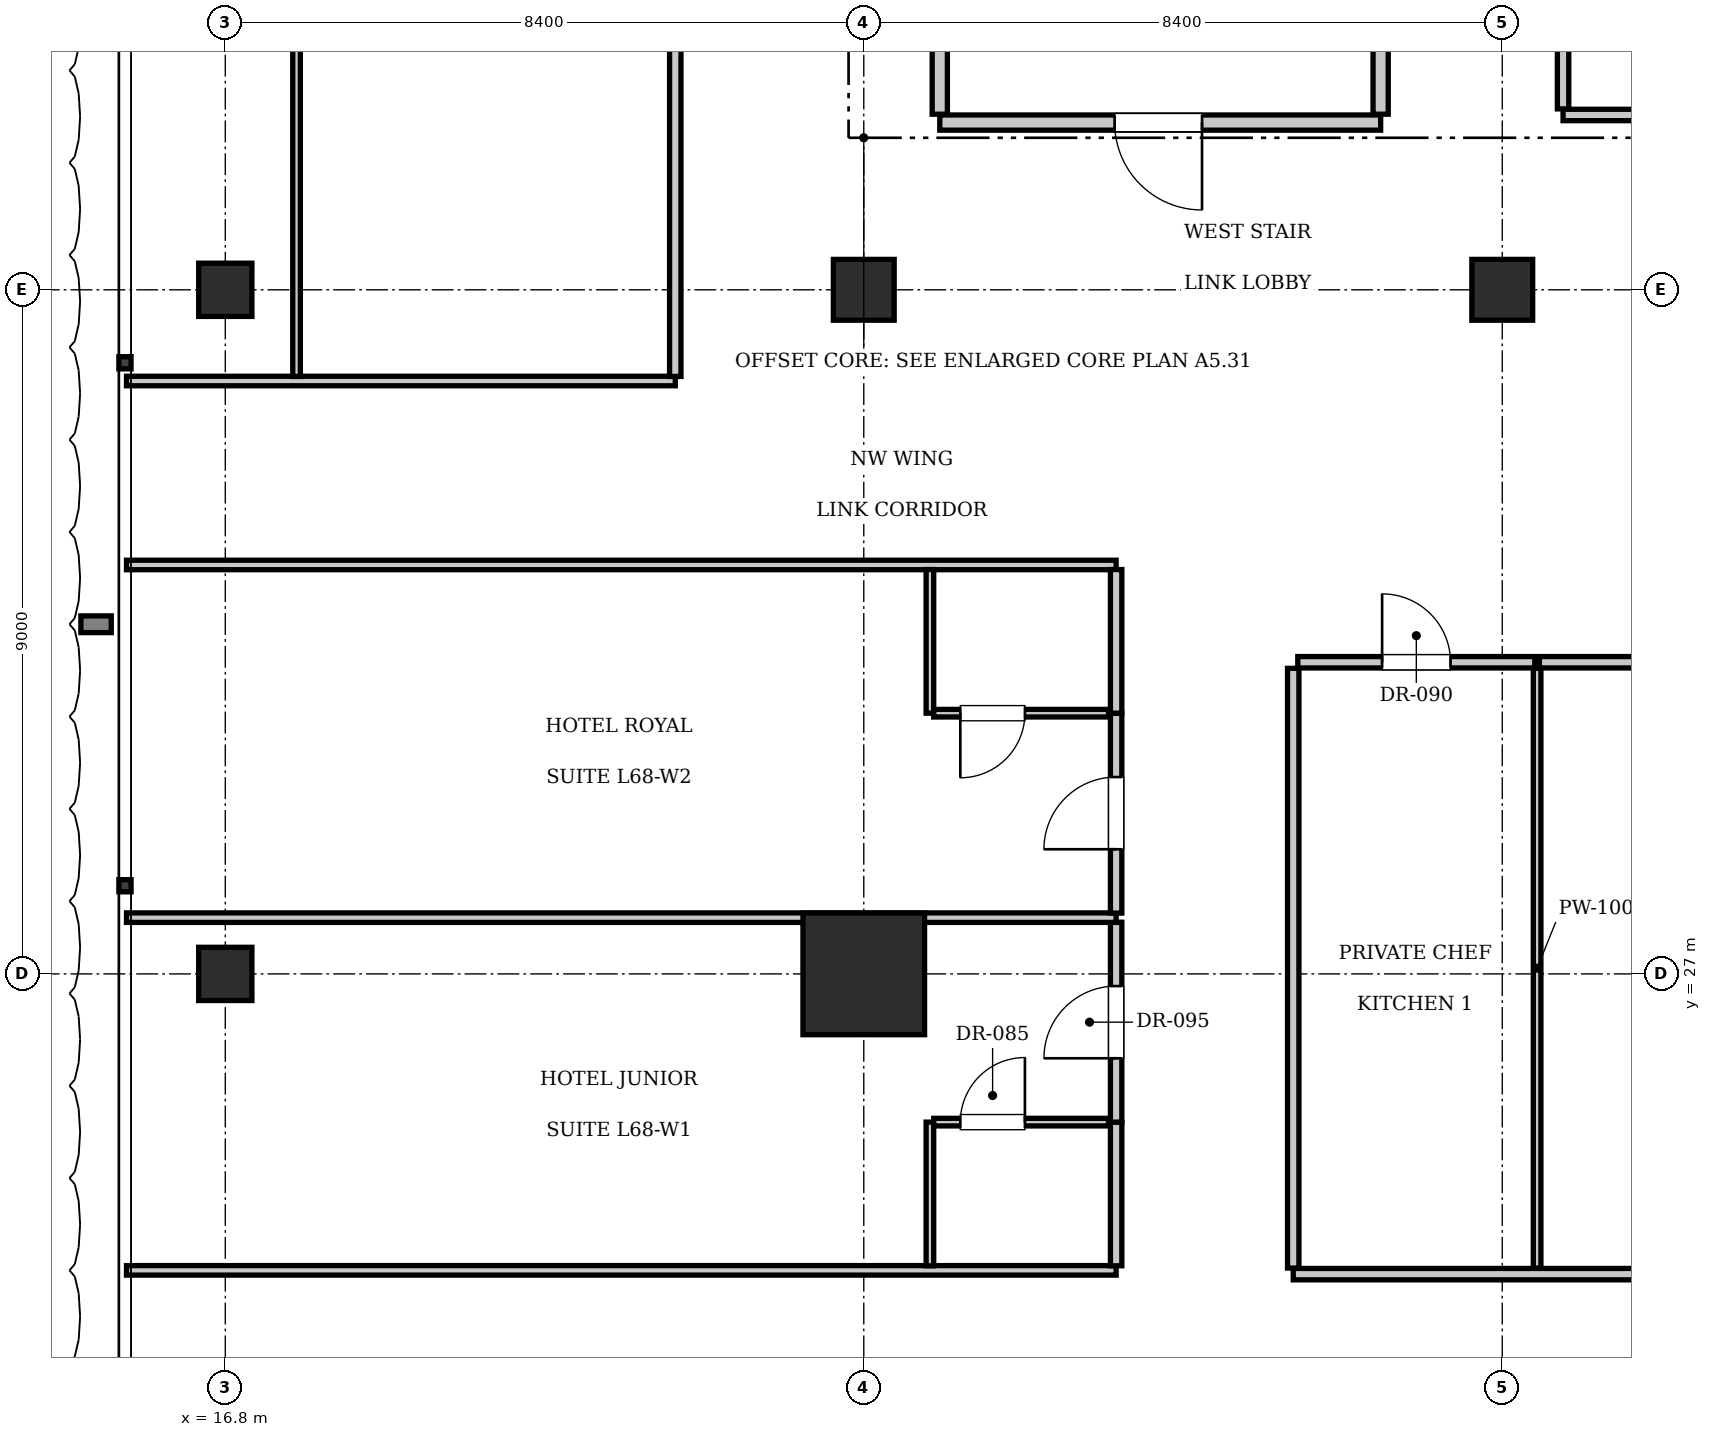
"""IFC4 building model, lengths in metres.
Left out: names, types, materials, properties, quantities, classifications, styles, units other than length and angle.
Written with IfcOpenShell. Run it as: python <this file> out.ifc"""

import sys

from ifc_helpers import new_model, si_unit, direction, frame, frame_2d, origin, origin_2d, place, context, subcontext, project, spatial, rectangle, extrude, element, fill, save


model = new_model("IFC4")
c1 = context("Model", 3, precision=1e-05, world=origin(), true_north=direction((0.0, 1.0)))
c2 = subcontext(c1, "Body", "Model", "MODEL_VIEW")
j1 = project(units=[si_unit("LENGTHUNIT", "METRE"), si_unit("PLANEANGLEUNIT", "RADIAN")], contexts=[c1])
p1 = place(None, origin())
s1 = spatial("IfcSite", under=j1, at=p1, CompositionType="ELEMENT")
p2 = place(p1, origin())
s2 = spatial("IfcBuilding", under=s1, at=p2, CompositionType="ELEMENT")
p3 = place(p2, frame((0.0, 0.0, 277.9)))
s3 = spatial("IfcBuildingStorey", under=s2, at=p3, CompositionType="ELEMENT", Elevation=277.9)
p4 = place(p3, frame((25.2, 27.0, 0.0), z_axis=(0.0, 0.0, 1.0), x_axis=(1.0, 0.0, 0.0)))
e1 = element("IfcColumn", 1, at=p4, inside=s3, PredefinedType="COLUMN", context=c2, shape_type="SweptSolid", body=[
    extrude(rectangle(XDim=1.6, YDim=1.6, at=origin_2d()), origin(), (0.0, 0.0, 1.0), 3.85),
])
for number, where, z_axis, x_axis in (
    (2, (25.2, 36.0, 0.0), (0.0, 0.0, 1.0), (1.0, 0.0, 0.0)),
    (3, (33.6, 36.0, 0.0), (0.0, 0.0, 1.0), (1.0, 0.0, 0.0)),
):
    element("IfcColumn", number, at=place(p3, frame(where, z_axis=z_axis, x_axis=x_axis)), inside=s3, PredefinedType="COLUMN", context=c2, shape_type="SweptSolid", body=[
        extrude(rectangle(XDim=0.8, YDim=0.8, at=origin_2d()), origin(), (0.0, 0.0, 1.0), 3.85),
    ])
for number, where, z_axis, x_axis in (
    (4, (16.8, 27.0, 0.0), (0.0, 0.0, 1.0), (1.0, 0.0, 0.0)),
    (5, (16.8, 36.0, 0.0), (0.0, 0.0, 1.0), (1.0, 0.0, 0.0)),
):
    element("IfcColumn", number, at=place(p3, frame(where, z_axis=z_axis, x_axis=x_axis)), inside=s3, PredefinedType="COLUMN", context=c2, shape_type="SweptSolid", body=[
        extrude(rectangle(XDim=0.7, YDim=0.7, at=origin_2d()), origin(), (0.0, 0.0, 1.0), 3.85),
    ])
p5 = place(p3, frame((26.2, 38.2, 0.0), z_axis=(0.0, 0.0, 1.0), x_axis=(1.0, 0.0, 0.0)))
e6 = element("IfcWall", 6, at=p5, inside=s3, PredefinedType="PARTITIONING", context=c2, shape_type="SweptSolid", body=[
    extrude(rectangle(XDim=5.8, YDim=0.2, at=frame_2d((2.9, 0.0))), origin(), (0.0, 0.0, 1.0), 3.61),
])
p6 = place(p5, frame((2.3, 0.0, 0.0)))
e7 = element("IfcOpeningElement", 7, at=p6, cuts=e6, PredefinedType="OPENING", context=c2, shape_type="SweptSolid", body=[
    extrude(rectangle(XDim=1.15, YDim=2.15, at=frame_2d((0.575, 1.075))), frame((0.0, 0.11, 0.0), z_axis=(0.0, -1.0, 0.0), x_axis=(1.0, 0.0, 0.0)), (0.0, 0.0, 1.0), 0.22),
])
for number, where, z_axis, x_axis in (
    (8, (26.2, 38.31, 0.0), (0.0, 0.0, 1.0), (0.0, 1.0, 0.0)),
    (9, (32.0, 38.31, 0.0), (0.0, 0.0, 1.0), (0.0, 1.0, 0.0)),
):
    element("IfcWall", number, at=place(p3, frame(where, z_axis=z_axis, x_axis=x_axis)), inside=s3, PredefinedType="PARTITIONING", context=c2, shape_type="SweptSolid", body=[
        extrude(rectangle(XDim=3.07, YDim=0.2, at=frame_2d((1.535, 0.0))), origin(), (0.0, 0.0, 1.0), 3.61),
    ])
p7 = place(p3, frame((34.4, 38.3, 0.0), z_axis=(0.0, 0.0, 1.0), x_axis=(1.0, 0.0, 0.0)))
e10 = element("IfcWall", 10, at=p7, inside=s3, PredefinedType="PARTITIONING", context=c2, shape_type="SweptSolid", body=[
    extrude(rectangle(XDim=2.88, YDim=0.15, at=frame_2d((1.44, 0.0))), origin(), (0.0, 0.0, 1.0), 3.61),
])
p8 = place(p7, frame((1.0, 0.0, 0.0)))
e11 = element("IfcOpeningElement", 11, at=p8, cuts=e10, PredefinedType="OPENING", context=c2, shape_type="SweptSolid", body=[
    extrude(rectangle(XDim=0.8, YDim=2.05, at=frame_2d((0.4, 1.025))), frame((0.0, 0.085, 0.0), z_axis=(0.0, -1.0, 0.0), x_axis=(1.0, 0.0, 0.0)), (0.0, 0.0, 1.0), 0.17),
])
p9 = place(p3, frame((34.4, 38.38, 0.0), z_axis=(0.0, 0.0, 1.0), x_axis=(0.0, 1.0, 0.0)))
e12 = element("IfcWall", 12, at=p9, inside=s3, PredefinedType="PARTITIONING", context=c2, shape_type="SweptSolid", body=[
    extrude(rectangle(XDim=2.84, YDim=0.15, at=frame_2d((1.42, 0.0))), origin(), (0.0, 0.0, 1.0), 3.61),
])
p10 = place(p3, frame((30.85, 23.05, 0.0), z_axis=(0.0, 0.0, 1.0), x_axis=(1.0, 0.0, 0.0)))
e13 = element("IfcWall", 13, at=p10, inside=s3, PredefinedType="PARTITIONING", context=c2, shape_type="SweptSolid", body=[
    extrude(rectangle(XDim=13.95, YDim=0.15, at=frame_2d((6.975, 0.0))), origin(), (0.0, 0.0, 1.0), 3.61),
])
p11 = place(p3, frame((30.85, 23.13, 0.0), z_axis=(0.0, 0.0, 1.0), x_axis=(0.0, 1.0, 0.0)))
e14 = element("IfcWall", 14, at=p11, inside=s3, PredefinedType="PARTITIONING", context=c2, shape_type="SweptSolid", body=[
    extrude(rectangle(XDim=7.89, YDim=0.15, at=frame_2d((3.945, 0.0))), origin(), (0.0, 0.0, 1.0), 3.61),
])
p12 = place(p3, frame((30.91, 31.1, 0.0), z_axis=(0.0, 0.0, 1.0), x_axis=(1.0, 0.0, 0.0)))
e15 = element("IfcWall", 15, at=p12, inside=s3, PredefinedType="PARTITIONING", context=c2, shape_type="SweptSolid", body=[
    extrude(rectangle(XDim=3.119, YDim=0.15, at=frame_2d((1.559, 0.0))), origin(), (0.0, 0.0, 1.0), 3.61),
])
p13 = place(p12, frame((1.109, 0.0, 0.0)))
e16 = element("IfcOpeningElement", 16, at=p13, cuts=e15, PredefinedType="OPENING", context=c2, shape_type="SweptSolid", body=[
    extrude(rectangle(XDim=0.9, YDim=2.1, at=frame_2d((0.45, 1.05))), frame((0.0, 0.085, 0.0), z_axis=(0.0, -1.0, 0.0), x_axis=(1.0, 0.0, 0.0)), (0.0, 0.0, 1.0), 0.17),
])
p14 = place(p3, frame((34.059, 23.13, 0.0), z_axis=(0.0, 0.0, 1.0), x_axis=(0.0, 1.0, 0.0)))
e17 = element("IfcWall", 17, at=p14, inside=s3, PredefinedType="PARTITIONING", context=c2, shape_type="SweptSolid", body=[
    extrude(rectangle(XDim=7.89, YDim=0.1, at=frame_2d((3.945, 0.0))), origin(), (0.0, 0.0, 1.0), 3.61),
])
p15 = place(p3, frame((34.088, 31.1, 0.0), z_axis=(0.0, 0.0, 1.0), x_axis=(1.0, 0.0, 0.0)))
e18 = element("IfcWall", 18, at=p15, inside=s3, PredefinedType="PARTITIONING", context=c2, shape_type="SweptSolid", body=[
    extrude(rectangle(XDim=4.683, YDim=0.15, at=frame_2d((2.342, 0.0))), origin(), (0.0, 0.0, 1.0), 3.61),
])
p16 = place(p15, frame((1.892, 0.0, 0.0)))
e19 = element("IfcOpeningElement", 19, at=p16, cuts=e18, PredefinedType="OPENING", context=c2, shape_type="SweptSolid", body=[
    extrude(rectangle(XDim=0.9, YDim=2.1, at=frame_2d((0.45, 1.05))), frame((0.0, 0.085, 0.0), z_axis=(0.0, -1.0, 0.0), x_axis=(1.0, 0.0, 0.0)), (0.0, 0.0, 1.0), 0.17),
])
for number, where, z_axis, x_axis in (
    (20, (15.5, 23.1, 0.0), (0.0, 0.0, 1.0), (1.0, 0.0, 0.0)),
    (21, (15.5, 32.38, 0.0), (0.0, 0.0, 1.0), (1.0, 0.0, 0.0)),
):
    element("IfcWall", number, at=place(p3, frame(where, z_axis=z_axis, x_axis=x_axis)), inside=s3, PredefinedType="PARTITIONING", context=c2, shape_type="SweptSolid", body=[
        extrude(rectangle(XDim=13.02, YDim=0.125, at=frame_2d((6.51, 0.0))), origin(), (0.0, 0.0, 1.0), 3.61),
    ])
p17 = place(p3, frame((28.52, 23.16, 0.0), z_axis=(0.0, 0.0, 1.0), x_axis=(0.0, 1.0, 0.0)))
e22 = element("IfcWall", 22, at=p17, inside=s3, PredefinedType="PARTITIONING", context=c2, shape_type="SweptSolid", body=[
    extrude(rectangle(XDim=1.89, YDim=0.15, at=frame_2d((0.945, 0.0))), origin(), (0.0, 0.0, 1.0), 3.61),
])
p18 = place(p3, frame((28.52, 25.05, 0.0), z_axis=(0.0, 0.0, 1.0), x_axis=(0.0, 1.0, 0.0)))
e23 = element("IfcWall", 23, at=p18, inside=s3, PredefinedType="PARTITIONING", context=c2, shape_type="SweptSolid", body=[
    extrude(rectangle(XDim=2.63, YDim=0.15, at=frame_2d((1.315, 0.0))), origin(), (0.0, 0.0, 1.0), 3.61),
])
p19 = place(p18, frame((0.84, 0.0, 0.0)))
e24 = element("IfcOpeningElement", 24, at=p19, cuts=e23, PredefinedType="OPENING", context=c2, shape_type="SweptSolid", body=[
    extrude(rectangle(XDim=0.95, YDim=2.15, at=frame_2d((0.475, 1.075))), frame((0.0, 0.085, 0.0), z_axis=(0.0, -1.0, 0.0), x_axis=(1.0, 0.0, 0.0)), (0.0, 0.0, 1.0), 0.17),
])
p20 = place(p3, frame((26.07, 23.16, 0.0), z_axis=(0.0, 0.0, 1.0), x_axis=(0.0, 1.0, 0.0)))
e25 = element("IfcWall", 25, at=p20, inside=s3, PredefinedType="PARTITIONING", context=c2, shape_type="SweptSolid", body=[
    extrude(rectangle(XDim=1.89, YDim=0.1, at=frame_2d((0.945, 0.0))), origin(), (0.0, 0.0, 1.0), 3.61),
])
p21 = place(p3, frame((26.12, 25.05, 0.0), z_axis=(0.0, 0.0, 1.0), x_axis=(1.0, 0.0, 0.0)))
e26 = element("IfcWall", 26, at=p21, inside=s3, PredefinedType="PARTITIONING", context=c2, shape_type="SweptSolid", body=[
    extrude(rectangle(XDim=2.3, YDim=0.1, at=frame_2d((1.15, 0.0))), origin(), (0.0, 0.0, 1.0), 3.61),
])
p22 = place(p21, frame((0.35, 0.0, 0.0)))
e27 = element("IfcOpeningElement", 27, at=p22, cuts=e26, PredefinedType="OPENING", context=c2, shape_type="SweptSolid", body=[
    extrude(rectangle(XDim=0.85, YDim=2.1, at=frame_2d((0.425, 1.05))), frame((0.0, 0.06, 0.0), z_axis=(0.0, -1.0, 0.0), x_axis=(1.0, 0.0, 0.0)), (0.0, 0.0, 1.0), 0.12),
])
p23 = place(p3, frame((15.5, 27.74, 0.0), z_axis=(0.0, 0.0, 1.0), x_axis=(1.0, 0.0, 0.0)))
e28 = element("IfcWall", 28, at=p23, inside=s3, PredefinedType="PARTITIONING", context=c2, shape_type="SweptSolid", body=[
    extrude(rectangle(XDim=13.02, YDim=0.125, at=frame_2d((6.51, 0.0))), origin(), (0.0, 0.0, 1.0), 3.61),
])
p24 = place(p3, frame((28.52, 27.8, 0.0), z_axis=(0.0, 0.0, 1.0), x_axis=(0.0, 1.0, 0.0)))
e29 = element("IfcWall", 29, at=p24, inside=s3, PredefinedType="PARTITIONING", context=c2, shape_type="SweptSolid", body=[
    extrude(rectangle(XDim=2.63, YDim=0.15, at=frame_2d((1.315, 0.0))), origin(), (0.0, 0.0, 1.0), 3.61),
])
p25 = place(p24, frame((0.84, 0.0, 0.0)))
e30 = element("IfcOpeningElement", 30, at=p25, cuts=e29, PredefinedType="OPENING", context=c2, shape_type="SweptSolid", body=[
    extrude(rectangle(XDim=0.95, YDim=2.15, at=frame_2d((0.475, 1.075))), frame((0.0, 0.085, 0.0), z_axis=(0.0, -1.0, 0.0), x_axis=(1.0, 0.0, 0.0)), (0.0, 0.0, 1.0), 0.17),
])
p26 = place(p3, frame((28.52, 30.43, 0.0), z_axis=(0.0, 0.0, 1.0), x_axis=(0.0, 1.0, 0.0)))
e31 = element("IfcWall", 31, at=p26, inside=s3, PredefinedType="PARTITIONING", context=c2, shape_type="SweptSolid", body=[
    extrude(rectangle(XDim=1.89, YDim=0.15, at=frame_2d((0.945, 0.0))), origin(), (0.0, 0.0, 1.0), 3.61),
])
p27 = place(p3, frame((26.07, 30.43, 0.0), z_axis=(0.0, 0.0, 1.0), x_axis=(0.0, 1.0, 0.0)))
e32 = element("IfcWall", 32, at=p27, inside=s3, PredefinedType="PARTITIONING", context=c2, shape_type="SweptSolid", body=[
    extrude(rectangle(XDim=1.89, YDim=0.1, at=frame_2d((0.945, 0.0))), origin(), (0.0, 0.0, 1.0), 3.61),
])
p28 = place(p3, frame((26.12, 30.43, 0.0), z_axis=(0.0, 0.0, 1.0), x_axis=(1.0, 0.0, 0.0)))
e33 = element("IfcWall", 33, at=p28, inside=s3, PredefinedType="PARTITIONING", context=c2, shape_type="SweptSolid", body=[
    extrude(rectangle(XDim=2.3, YDim=0.1, at=frame_2d((1.15, 0.0))), origin(), (0.0, 0.0, 1.0), 3.61),
])
p29 = place(p28, frame((0.35, 0.0, 0.0)))
e34 = element("IfcOpeningElement", 34, at=p29, cuts=e33, PredefinedType="OPENING", context=c2, shape_type="SweptSolid", body=[
    extrude(rectangle(XDim=0.85, YDim=2.1, at=frame_2d((0.425, 1.05))), frame((0.0, 0.06, 0.0), z_axis=(0.0, -1.0, 0.0), x_axis=(1.0, 0.0, 0.0)), (0.0, 0.0, 1.0), 0.12),
])
p30 = place(p3, frame((15.5, 34.8, 0.0), z_axis=(0.0, 0.0, 1.0), x_axis=(1.0, 0.0, 0.0)))
e35 = element("IfcWall", 35, at=p30, inside=s3, PredefinedType="PARTITIONING", context=c2, shape_type="SweptSolid", body=[
    extrude(rectangle(XDim=7.22, YDim=0.125, at=frame_2d((3.61, 0.0))), origin(), (0.0, 0.0, 1.0), 3.61),
])
p31 = place(p3, frame((22.72, 34.86, 0.0), z_axis=(0.0, 0.0, 1.0), x_axis=(0.0, 1.0, 0.0)))
e36 = element("IfcWall", 36, at=p31, inside=s3, PredefinedType="PARTITIONING", context=c2, shape_type="SweptSolid", body=[
    extrude(rectangle(XDim=11.527, YDim=0.15, at=frame_2d((5.764, 0.0))), origin(), (0.0, 0.0, 1.0), 3.61),
])
p32 = place(p31, frame((5.289, 0.0, 0.0)))
e37 = element("IfcOpeningElement", 37, at=p32, cuts=e36, PredefinedType="OPENING", context=c2, shape_type="SweptSolid", body=[
    extrude(rectangle(XDim=0.95, YDim=2.15, at=frame_2d((0.475, 1.075))), frame((0.0, 0.085, 0.0), z_axis=(0.0, -1.0, 0.0), x_axis=(1.0, 0.0, 0.0)), (0.0, 0.0, 1.0), 0.17),
])
p33 = place(p3, frame((17.738, 34.86, 0.0), z_axis=(0.0, 0.0, 1.0), x_axis=(0.0, 1.0, 0.0)))
e38 = element("IfcWall", 38, at=p33, inside=s3, PredefinedType="PARTITIONING", context=c2, shape_type="SweptSolid", body=[
    extrude(rectangle(XDim=13.938, YDim=0.1, at=frame_2d((6.969, 0.0))), origin(), (0.0, 0.0, 1.0), 3.61),
])
p34 = place(p33, frame((6.519, 0.0, 0.0)))
e39 = element("IfcOpeningElement", 39, at=p34, cuts=e38, PredefinedType="OPENING", context=c2, shape_type="SweptSolid", body=[
    extrude(rectangle(XDim=0.9, YDim=2.1, at=frame_2d((0.45, 1.05))), frame((0.0, 0.06, 0.0), z_axis=(0.0, -1.0, 0.0), x_axis=(1.0, 0.0, 0.0)), (0.0, 0.0, 1.0), 0.12),
])
p35 = place(p6, frame((1.15, 0.0, 0.0), z_axis=(0.0, 0.0, 1.0), x_axis=(-1.0, 0.0, 0.0)))
e40 = element("IfcDoor", 40, at=p35, inside=s3, OperationType="SINGLE_SWING_LEFT", PredefinedType="DOOR", context=c2, shape_type="SweptSolid", body=[
    extrude(rectangle(XDim=1.15, YDim=2.15, at=frame_2d((0.575, 1.075))), frame((0.0, 0.025, 0.0), z_axis=(0.0, -1.0, 0.0), x_axis=(1.0, 0.0, 0.0)), (0.0, 0.0, 1.0), 0.05),
])
fill(e7, e40)
p36 = place(p13, origin())
e41 = element("IfcDoor", 41, at=p36, inside=s3, OperationType="SINGLE_SWING_LEFT", PredefinedType="DOOR", context=c2, shape_type="SweptSolid", body=[
    extrude(rectangle(XDim=0.9, YDim=2.1, at=frame_2d((0.45, 1.05))), frame((0.0, 0.025, 0.0), z_axis=(0.0, -1.0, 0.0), x_axis=(1.0, 0.0, 0.0)), (0.0, 0.0, 1.0), 0.05),
])
fill(e16, e41)
p37 = place(p22, origin())
e42 = element("IfcDoor", 42, at=p37, inside=s3, OperationType="SINGLE_SWING_RIGHT", PredefinedType="DOOR", context=c2, shape_type="SweptSolid", body=[
    extrude(rectangle(XDim=0.85, YDim=2.1, at=frame_2d((0.425, 1.05))), frame((0.0, 0.025, 0.0), z_axis=(0.0, -1.0, 0.0), x_axis=(1.0, 0.0, 0.0)), (0.0, 0.0, 1.0), 0.05),
])
fill(e27, e42)
p38 = place(p19, origin())
e43 = element("IfcDoor", 43, at=p38, inside=s3, OperationType="SINGLE_SWING_LEFT", PredefinedType="DOOR", context=c2, shape_type="SweptSolid", body=[
    extrude(rectangle(XDim=0.95, YDim=2.15, at=frame_2d((0.475, 1.075))), frame((0.0, 0.025, 0.0), z_axis=(0.0, -1.0, 0.0), x_axis=(1.0, 0.0, 0.0)), (0.0, 0.0, 1.0), 0.05),
])
fill(e24, e43)
p39 = place(p29, frame((0.85, 0.0, 0.0), z_axis=(0.0, 0.0, 1.0), x_axis=(-1.0, 0.0, 0.0)))
e44 = element("IfcDoor", 44, at=p39, inside=s3, OperationType="SINGLE_SWING_RIGHT", PredefinedType="DOOR", context=c2, shape_type="SweptSolid", body=[
    extrude(rectangle(XDim=0.85, YDim=2.1, at=frame_2d((0.425, 1.05))), frame((0.0, 0.025, 0.0), z_axis=(0.0, -1.0, 0.0), x_axis=(1.0, 0.0, 0.0)), (0.0, 0.0, 1.0), 0.05),
])
fill(e34, e44)
p40 = place(p25, origin())
e45 = element("IfcDoor", 45, at=p40, inside=s3, OperationType="SINGLE_SWING_LEFT", PredefinedType="DOOR", context=c2, shape_type="SweptSolid", body=[
    extrude(rectangle(XDim=0.95, YDim=2.15, at=frame_2d((0.475, 1.075))), frame((0.0, 0.025, 0.0), z_axis=(0.0, -1.0, 0.0), x_axis=(1.0, 0.0, 0.0)), (0.0, 0.0, 1.0), 0.05),
])
fill(e30, e45)
save(model, sys.argv[1])
